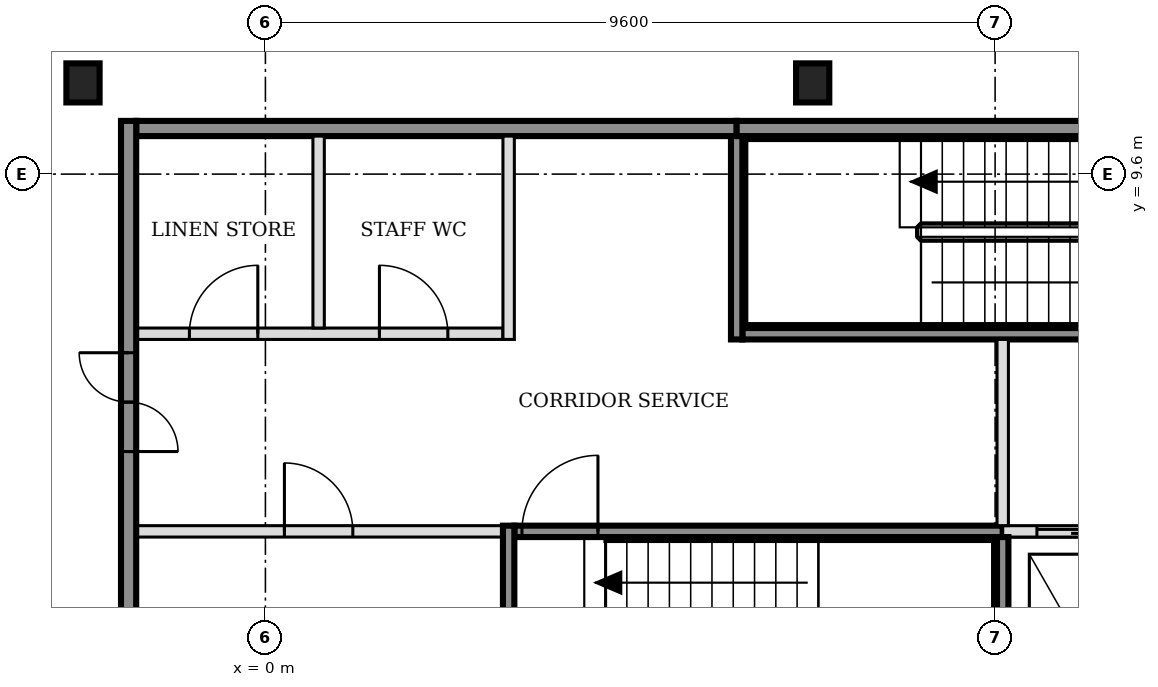
"""IFC4 building model, lengths in metres.
Left out: names, types, materials, properties, quantities, classifications, styles, units other than length and angle.
Written with IfcOpenShell. Run it as: python <this file> out.ifc"""

import sys

from ifc_helpers import new_model, si_unit, direction, frame, frame_2d, origin, origin_2d, place, context, subcontext, project, spatial, rectangle, i_section, extrude, element, fill, save


model = new_model("IFC4")
c1 = context("Model", 3, precision=1e-05, world=origin(), true_north=direction((0.0, 1.0)))
c2 = subcontext(c1, "Body", "Model", "MODEL_VIEW")
j1 = project(units=[si_unit("LENGTHUNIT", "METRE"), si_unit("PLANEANGLEUNIT", "RADIAN")], contexts=[c1])
p1 = place(None, origin())
s1 = spatial("IfcSite", under=j1, at=p1, CompositionType="ELEMENT")
p2 = place(p1, origin())
s2 = spatial("IfcBuilding", under=s1, at=p2, CompositionType="ELEMENT")
p3 = place(p2, frame((0.0, 0.0, 72.6)))
s3 = spatial("IfcBuildingStorey", under=s2, at=p3, CompositionType="ELEMENT", Elevation=72.6)
for number, where, z_axis, x_axis in (
    (1, (-2.4, 10.8, -0.15), (0.0, 0.0, 1.0), (1.0, 0.0, 0.0)),
    (2, (7.2, 10.8, -0.15), (0.0, 0.0, 1.0), (1.0, 0.0, 0.0)),
):
    element("IfcColumn", number, at=place(p3, frame(where, z_axis=z_axis, x_axis=x_axis)), inside=s3, PredefinedType="COLUMN", context=c2, shape_type="SweptSolid", body=[
        extrude(i_section(OverallWidth=0.437, OverallDepth=0.514, WebThickness=0.061, FlangeThickness=0.097, FilletRadius=0.015, at=origin_2d()), origin(), (0.0, 0.0, 1.0), 3.6),
    ])
p4 = place(p3, frame((-1.7, 4.9, 0.0), z_axis=(0.0, 0.0, 1.0), x_axis=(1.0, 0.0, 0.0)))
e3 = element("IfcWall", 3, at=p4, inside=s3, PredefinedType="PARTITIONING", context=c2, shape_type="SweptSolid", body=[
    extrude(rectangle(XDim=4.825, YDim=0.15, at=frame_2d((2.413, 0.0))), origin(), (0.0, 0.0, 1.0), 3.45),
])
p5 = place(p4, frame((1.95, 0.0, 0.0)))
e4 = element("IfcOpeningElement", 4, at=p5, cuts=e3, PredefinedType="OPENING", context=c2, shape_type="SweptSolid", body=[
    extrude(rectangle(XDim=0.9, YDim=2.1, at=frame_2d((0.45, 1.05))), frame((0.0, 0.085, 0.0), z_axis=(0.0, -1.0, 0.0), x_axis=(1.0, 0.0, 0.0)), (0.0, 0.0, 1.0), 0.17),
])
p6 = place(p3, frame((3.275, 4.9, 0.0), z_axis=(0.0, 0.0, 1.0), x_axis=(1.0, 0.0, 0.0)))
e5 = element("IfcWall", 5, at=p6, inside=s3, PredefinedType="SOLIDWALL", context=c2, shape_type="SweptSolid", body=[
    extrude(rectangle(XDim=6.425, YDim=0.15, at=frame_2d((3.212, 0.0))), origin(), (0.0, 0.0, 1.0), 3.45),
])
p7 = place(p6, frame((0.1, 0.0, 0.0)))
e6 = element("IfcOpeningElement", 6, at=p7, cuts=e5, PredefinedType="OPENING", context=c2, shape_type="SweptSolid", body=[
    extrude(rectangle(XDim=1.0, YDim=2.1, at=frame_2d((0.5, 1.05))), frame((0.0, 0.085, 0.0), z_axis=(0.0, -1.0, 0.0), x_axis=(1.0, 0.0, 0.0)), (0.0, 0.0, 1.0), 0.17),
])
p8 = place(p3, frame((9.7, 4.9, 0.0), z_axis=(0.0, 0.0, 1.0), x_axis=(1.0, 0.0, 0.0)))
e7 = element("IfcWall", 7, at=p8, inside=s3, PredefinedType="SOLIDWALL", context=c2, shape_type="SweptSolid", body=[
    extrude(rectangle(XDim=6.4, YDim=0.15, at=frame_2d((3.2, 0.0))), origin(), (0.0, 0.0, 1.0), 3.45),
])
p9 = place(p8, frame((0.45, 0.0, 0.0)))
e8 = element("IfcOpeningElement", 8, at=p9, cuts=e7, PredefinedType="OPENING", context=c2, shape_type="SweptSolid", body=[
    extrude(rectangle(XDim=1.0, YDim=2.1, at=frame_2d((0.5, 1.05))), frame((0.0, 0.085, 0.0), z_axis=(0.0, -1.0, 0.0), x_axis=(1.0, 0.0, 0.0)), (0.0, 0.0, 1.0), 0.17),
])
p10 = place(p8, frame((2.35, 0.0, 0.0)))
e9 = element("IfcOpeningElement", 9, at=p10, cuts=e7, PredefinedType="OPENING", context=c2, shape_type="SweptSolid", body=[
    extrude(rectangle(XDim=1.0, YDim=2.1, at=frame_2d((0.5, 1.05))), frame((0.0, 0.085, 0.0), z_axis=(0.0, -1.0, 0.0), x_axis=(1.0, 0.0, 0.0)), (0.0, 0.0, 1.0), 0.17),
])
p11 = place(p8, frame((4.7, 0.0, 0.0)))
e10 = element("IfcOpeningElement", 10, at=p11, cuts=e7, PredefinedType="OPENING", context=c2, shape_type="SweptSolid", body=[
    extrude(rectangle(XDim=0.9, YDim=2.1, at=frame_2d((0.45, 1.05))), frame((0.0, 0.085, 0.0), z_axis=(0.0, -1.0, 0.0), x_axis=(1.0, 0.0, 0.0)), (0.0, 0.0, 1.0), 0.17),
])
p12 = place(p3, frame((-1.7, 7.5, 0.0), z_axis=(0.0, 0.0, 1.0), x_axis=(1.0, 0.0, 0.0)))
e11 = element("IfcWall", 11, at=p12, inside=s3, PredefinedType="PARTITIONING", context=c2, shape_type="SweptSolid", body=[
    extrude(rectangle(XDim=4.825, YDim=0.15, at=frame_2d((2.413, 0.0))), origin(), (0.0, 0.0, 1.0), 3.45),
])
p13 = place(p12, frame((0.7, 0.0, 0.0)))
e12 = element("IfcOpeningElement", 12, at=p13, cuts=e11, PredefinedType="OPENING", context=c2, shape_type="SweptSolid", body=[
    extrude(rectangle(XDim=0.9, YDim=2.1, at=frame_2d((0.45, 1.05))), frame((0.0, 0.085, 0.0), z_axis=(0.0, -1.0, 0.0), x_axis=(1.0, 0.0, 0.0)), (0.0, 0.0, 1.0), 0.17),
])
p14 = place(p12, frame((3.2, 0.0, 0.0)))
e13 = element("IfcOpeningElement", 13, at=p14, cuts=e11, PredefinedType="OPENING", context=c2, shape_type="SweptSolid", body=[
    extrude(rectangle(XDim=0.9, YDim=2.1, at=frame_2d((0.45, 1.05))), frame((0.0, 0.085, 0.0), z_axis=(0.0, -1.0, 0.0), x_axis=(1.0, 0.0, 0.0)), (0.0, 0.0, 1.0), 0.17),
])
p15 = place(p3, frame((6.275, 7.5, 0.0), z_axis=(0.0, 0.0, 1.0), x_axis=(1.0, 0.0, 0.0)))
e14 = element("IfcWall", 14, at=p15, inside=s3, PredefinedType="SOLIDWALL", context=c2, shape_type="SweptSolid", body=[
    extrude(rectangle(XDim=6.425, YDim=0.15, at=frame_2d((3.212, 0.0))), origin(), (0.0, 0.0, 1.0), 3.45),
])
p16 = place(p15, frame((5.225, 0.0, 0.0)))
e15 = element("IfcOpeningElement", 15, at=p16, cuts=e14, PredefinedType="OPENING", context=c2, shape_type="SweptSolid", body=[
    extrude(rectangle(XDim=1.0, YDim=2.1, at=frame_2d((0.5, 1.05))), frame((0.0, 0.085, 0.0), z_axis=(0.0, -1.0, 0.0), x_axis=(1.0, 0.0, 0.0)), (0.0, 0.0, 1.0), 0.17),
])
p17 = place(p3, frame((-1.7, 10.2, 0.0), z_axis=(0.0, 0.0, 1.0), x_axis=(1.0, 0.0, 0.0)))
e16 = element("IfcWall", 16, at=p17, inside=s3, PredefinedType="SOLIDWALL", context=c2, shape_type="SweptSolid", body=[
    extrude(rectangle(XDim=7.9, YDim=0.2, at=frame_2d((3.95, 0.0))), origin(), (0.0, 0.0, 1.0), 3.45),
])
p18 = place(p3, frame((6.2, 10.2, 0.0), z_axis=(0.0, 0.0, 1.0), x_axis=(1.0, 0.0, 0.0)))
e17 = element("IfcWall", 17, at=p18, inside=s3, PredefinedType="SOLIDWALL", context=c2, shape_type="SweptSolid", body=[
    extrude(rectangle(XDim=6.5, YDim=0.2, at=frame_2d((3.25, 0.0))), origin(), (0.0, 0.0, 1.0), 3.45),
])
p19 = place(p3, frame((-1.8, -5.5, 0.0), z_axis=(0.0, 0.0, 1.0), x_axis=(0.0, 1.0, 0.0)))
e18 = element("IfcWall", 18, at=p19, inside=s3, PredefinedType="SOLIDWALL", context=c2, shape_type="SweptSolid", body=[
    extrude(rectangle(XDim=15.8, YDim=0.2, at=frame_2d((7.9, 0.0))), origin(), (0.0, 0.0, 1.0), 3.45),
])
p20 = place(p19, frame((3.05, 0.0, 0.0)))
e19 = element("IfcOpeningElement", 19, at=p20, cuts=e18, PredefinedType="OPENING", context=c2, shape_type="SweptSolid", body=[
    extrude(rectangle(XDim=1.3, YDim=2.1, at=frame_2d((0.65, 1.05))), frame((0.0, 0.11, 0.0), z_axis=(0.0, -1.0, 0.0), x_axis=(1.0, 0.0, 0.0)), (0.0, 0.0, 1.0), 0.22),
])
p21 = place(p19, frame((11.45, 0.0, 0.0)))
e20 = element("IfcOpeningElement", 20, at=p21, cuts=e18, PredefinedType="OPENING", context=c2, shape_type="SweptSolid", body=[
    extrude(rectangle(XDim=1.3, YDim=2.1, at=frame_2d((0.65, 1.05))), frame((0.0, 0.11, 0.0), z_axis=(0.0, -1.0, 0.0), x_axis=(1.0, 0.0, 0.0)), (0.0, 0.0, 1.0), 0.22),
])
p22 = place(p3, frame((0.7, 7.575, 0.0), z_axis=(0.0, 0.0, 1.0), x_axis=(0.0, 1.0, 0.0)))
e21 = element("IfcWall", 21, at=p22, inside=s3, PredefinedType="PARTITIONING", context=c2, shape_type="SweptSolid", body=[
    extrude(rectangle(XDim=2.525, YDim=0.15, at=frame_2d((1.263, 0.0))), origin(), (0.0, 0.0, 1.0), 3.45),
])
p23 = place(p3, frame((3.2, 2.275, 0.0), z_axis=(0.0, 0.0, 1.0), x_axis=(0.0, 1.0, 0.0)))
e22 = element("IfcWall", 22, at=p23, inside=s3, PredefinedType="SOLIDWALL", context=c2, shape_type="SweptSolid", body=[
    extrude(rectangle(XDim=2.7, YDim=0.15, at=frame_2d((1.35, 0.0))), origin(), (0.0, 0.0, 1.0), 3.45),
])
p24 = place(p3, frame((3.2, 7.425, 0.0), z_axis=(0.0, 0.0, 1.0), x_axis=(0.0, 1.0, 0.0)))
e23 = element("IfcWall", 23, at=p24, inside=s3, PredefinedType="PARTITIONING", context=c2, shape_type="SweptSolid", body=[
    extrude(rectangle(XDim=2.675, YDim=0.15, at=frame_2d((1.337, 0.0))), origin(), (0.0, 0.0, 1.0), 3.45),
])
p25 = place(p3, frame((6.2, 7.425, 0.0), z_axis=(0.0, 0.0, 1.0), x_axis=(0.0, 1.0, 0.0)))
e24 = element("IfcWall", 24, at=p25, inside=s3, PredefinedType="SOLIDWALL", context=c2, shape_type="SweptSolid", body=[
    extrude(rectangle(XDim=2.675, YDim=0.15, at=frame_2d((1.337, 0.0))), origin(), (0.0, 0.0, 1.0), 3.45),
])
p26 = place(p3, frame((9.7, 2.275, 0.0), z_axis=(0.0, 0.0, 1.0), x_axis=(0.0, 1.0, 0.0)))
e25 = element("IfcWall", 25, at=p26, inside=s3, PredefinedType="SOLIDWALL", context=c2, shape_type="SweptSolid", body=[
    extrude(rectangle(XDim=2.55, YDim=0.15, at=frame_2d((1.275, 0.0))), origin(), (0.0, 0.0, 1.0), 3.45),
])
p27 = place(p3, frame((9.7, 4.975, 0.0), z_axis=(0.0, 0.0, 1.0), x_axis=(0.0, 1.0, 0.0)))
e26 = element("IfcWall", 26, at=p27, inside=s3, PredefinedType="SOLIDWALL", context=c2, shape_type="SweptSolid", body=[
    extrude(rectangle(XDim=2.45, YDim=0.15, at=frame_2d((1.225, 0.0))), origin(), (0.0, 0.0, 1.0), 3.45),
])
p28 = place(p9, origin())
e27 = element("IfcDoor", 27, at=p28, inside=s3, OperationType="DOUBLE_DOOR_SLIDING", PredefinedType="DOOR", context=c2, shape_type="SweptSolid", body=[
    extrude(rectangle(XDim=1.0, YDim=2.1, at=frame_2d((0.5, 1.05))), frame((0.0, 0.025, 0.0), z_axis=(0.0, -1.0, 0.0), x_axis=(1.0, 0.0, 0.0)), (0.0, 0.0, 1.0), 0.05),
])
fill(e8, e27)
p29 = place(p7, origin())
e28 = element("IfcDoor", 28, at=p29, inside=s3, OperationType="SINGLE_SWING_RIGHT", PredefinedType="DOOR", context=c2, shape_type="SweptSolid", body=[
    extrude(rectangle(XDim=1.0, YDim=2.1, at=frame_2d((0.5, 1.05))), frame((0.0, 0.025, 0.0), z_axis=(0.0, -1.0, 0.0), x_axis=(1.0, 0.0, 0.0)), (0.0, 0.0, 1.0), 0.05),
])
fill(e6, e28)
p30 = place(p21, origin())
e29 = element("IfcDoor", 29, at=p30, inside=s3, OperationType="DOUBLE_DOOR_SINGLE_SWING", PredefinedType="DOOR", context=c2, shape_type="SweptSolid", body=[
    extrude(rectangle(XDim=1.3, YDim=2.1, at=frame_2d((0.65, 1.05))), frame((0.0, 0.025, 0.0), z_axis=(0.0, -1.0, 0.0), x_axis=(1.0, 0.0, 0.0)), (0.0, 0.0, 1.0), 0.05),
])
fill(e20, e29)
p31 = place(p5, origin())
e30 = element("IfcDoor", 30, at=p31, inside=s3, OperationType="SINGLE_SWING_LEFT", PredefinedType="DOOR", context=c2, shape_type="SweptSolid", body=[
    extrude(rectangle(XDim=0.9, YDim=2.1, at=frame_2d((0.45, 1.05))), frame((0.0, 0.025, 0.0), z_axis=(0.0, -1.0, 0.0), x_axis=(1.0, 0.0, 0.0)), (0.0, 0.0, 1.0), 0.05),
])
fill(e4, e30)
p32 = place(p13, origin())
e31 = element("IfcDoor", 31, at=p32, inside=s3, OperationType="SINGLE_SWING_RIGHT", PredefinedType="DOOR", context=c2, shape_type="SweptSolid", body=[
    extrude(rectangle(XDim=0.9, YDim=2.1, at=frame_2d((0.45, 1.05))), frame((0.0, 0.025, 0.0), z_axis=(0.0, -1.0, 0.0), x_axis=(1.0, 0.0, 0.0)), (0.0, 0.0, 1.0), 0.05),
])
fill(e12, e31)
p33 = place(p14, origin())
e32 = element("IfcDoor", 32, at=p33, inside=s3, OperationType="SINGLE_SWING_LEFT", PredefinedType="DOOR", context=c2, shape_type="SweptSolid", body=[
    extrude(rectangle(XDim=0.9, YDim=2.1, at=frame_2d((0.45, 1.05))), frame((0.0, 0.025, 0.0), z_axis=(0.0, -1.0, 0.0), x_axis=(1.0, 0.0, 0.0)), (0.0, 0.0, 1.0), 0.05),
])
fill(e13, e32)
save(model, sys.argv[1])
